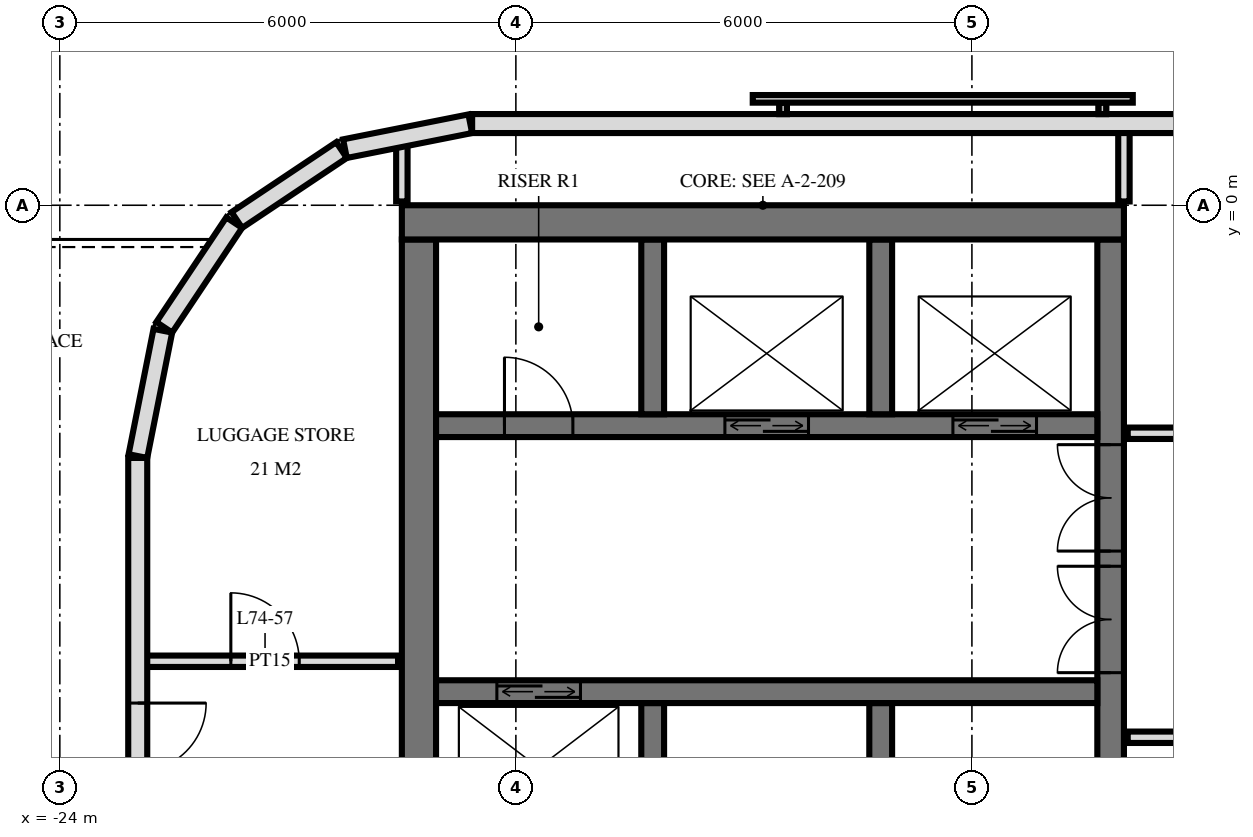
"""IFC4 building model, lengths in metres.
Left out: names, types, materials, properties, quantities, classifications, styles, units other than length and angle.
Written with IfcOpenShell. Run it as: python <this file> out.ifc"""

import sys

from ifc_helpers import new_model, si_unit, direction, frame, frame_2d, origin, place, context, subcontext, project, spatial, rectangle, extrude, element, fill, save


model = new_model("IFC4")
c1 = context("Model", 3, precision=1e-05, world=origin(), true_north=direction((0.0, 1.0)))
c2 = subcontext(c1, "Body", "Model", "MODEL_VIEW")
j1 = project(units=[si_unit("LENGTHUNIT", "METRE"), si_unit("PLANEANGLEUNIT", "RADIAN")], contexts=[c1])
p1 = place(None, origin())
s1 = spatial("IfcSite", under=j1, at=p1, CompositionType="ELEMENT")
p2 = place(p1, origin())
s2 = spatial("IfcBuilding", under=s1, at=p2, CompositionType="ELEMENT")
p3 = place(p2, frame((0.0, 0.0, 280.6)))
s3 = spatial("IfcBuildingStorey", under=s2, at=p3, CompositionType="ELEMENT", Elevation=280.6)
p4 = place(p3, frame((-19.5, -0.225, 0.0), z_axis=(0.0, 0.0, 1.0), x_axis=(1.0, 0.0, 0.0)))
e1 = element("IfcWall", 1, at=p4, inside=s3, PredefinedType="SHEAR", context=c2, shape_type="SweptSolid", body=[
    extrude(rectangle(XDim=9.5, YDim=0.45, at=frame_2d((4.75, 0.0))), origin(), (0.0, 0.0, 1.0), 3.5),
])
p5 = place(p3, frame((-10.175, -14.55, 0.0), z_axis=(0.0, 0.0, 1.0), x_axis=(0.0, 1.0, 0.0)))
e2 = element("IfcWall", 2, at=p5, inside=s3, PredefinedType="SHEAR", context=c2, shape_type="SweptSolid", body=[
    extrude(rectangle(XDim=14.1, YDim=0.35, at=frame_2d((7.05, 0.0))), origin(), (0.0, 0.0, 1.0), 3.5),
])
p6 = place(p5, frame((8.4, 0.0, 0.0)))
e3 = element("IfcOpeningElement", 3, at=p6, cuts=e2, PredefinedType="OPENING", context=c2, shape_type="SweptSolid", body=[
    extrude(rectangle(XDim=1.4, YDim=2.4, at=frame_2d((0.7, 1.2))), frame((0.0, 0.185, 0.0), z_axis=(0.0, -1.0, 0.0), x_axis=(1.0, 0.0, 0.0)), (0.0, 0.0, 1.0), 0.37),
])
p7 = place(p5, frame((10.0, 0.0, 0.0)))
e4 = element("IfcOpeningElement", 4, at=p7, cuts=e2, PredefinedType="OPENING", context=c2, shape_type="SweptSolid", body=[
    extrude(rectangle(XDim=1.4, YDim=2.4, at=frame_2d((0.7, 1.2))), frame((0.0, 0.185, 0.0), z_axis=(0.0, -1.0, 0.0), x_axis=(1.0, 0.0, 0.0)), (0.0, 0.0, 1.0), 0.37),
])
p8 = place(p5, frame((4.0, 0.0, 0.0)))
e5 = element("IfcOpeningElement", 5, at=p8, cuts=e2, PredefinedType="OPENING", context=c2, shape_type="SweptSolid", body=[
    extrude(rectangle(XDim=1.2, YDim=2.1, at=frame_2d((0.6, 1.05))), frame((0.0, 0.185, 0.0), z_axis=(0.0, -1.0, 0.0), x_axis=(1.0, 0.0, 0.0)), (0.0, 0.0, 1.0), 0.37),
])
p9 = place(p3, frame((-19.275, -14.55, 0.0), z_axis=(0.0, 0.0, 1.0), x_axis=(0.0, 1.0, 0.0)))
e6 = element("IfcWall", 6, at=p9, inside=s3, PredefinedType="SHEAR", context=c2, shape_type="SweptSolid", body=[
    extrude(rectangle(XDim=14.1, YDim=0.45, at=frame_2d((7.05, 0.0))), origin(), (0.0, 0.0, 1.0), 3.5),
])
p10 = place(p3, frame((-19.05, -2.9, 0.0), z_axis=(0.0, 0.0, 1.0), x_axis=(1.0, 0.0, 0.0)))
e7 = element("IfcWall", 7, at=p10, inside=s3, PredefinedType="SHEAR", context=c2, shape_type="SweptSolid", body=[
    extrude(rectangle(XDim=8.7, YDim=0.3, at=frame_2d((4.35, 0.0))), origin(), (0.0, 0.0, 1.0), 3.5),
])
p11 = place(p10, frame((6.8, 0.0, 0.0)))
e8 = element("IfcOpeningElement", 8, at=p11, cuts=e7, PredefinedType="OPENING", context=c2, shape_type="SweptSolid", body=[
    extrude(rectangle(XDim=1.1, YDim=2.1, at=frame_2d((0.55, 1.05))), frame((0.0, 0.16, 0.0), z_axis=(0.0, -1.0, 0.0), x_axis=(1.0, 0.0, 0.0)), (0.0, 0.0, 1.0), 0.32),
])
p12 = place(p10, frame((3.8, 0.0, 0.0)))
e9 = element("IfcOpeningElement", 9, at=p12, cuts=e7, PredefinedType="OPENING", context=c2, shape_type="SweptSolid", body=[
    extrude(rectangle(XDim=1.1, YDim=2.1, at=frame_2d((0.55, 1.05))), frame((0.0, 0.16, 0.0), z_axis=(0.0, -1.0, 0.0), x_axis=(1.0, 0.0, 0.0)), (0.0, 0.0, 1.0), 0.32),
])
p13 = place(p10, frame((0.9, 0.0, 0.0)))
e10 = element("IfcOpeningElement", 10, at=p13, cuts=e7, PredefinedType="OPENING", context=c2, shape_type="SweptSolid", body=[
    extrude(rectangle(XDim=0.9, YDim=2.1, at=frame_2d((0.45, 1.05))), frame((0.0, 0.16, 0.0), z_axis=(0.0, -1.0, 0.0), x_axis=(1.0, 0.0, 0.0)), (0.0, 0.0, 1.0), 0.32),
])
p14 = place(p3, frame((-19.05, -6.4, 0.0), z_axis=(0.0, 0.0, 1.0), x_axis=(1.0, 0.0, 0.0)))
e11 = element("IfcWall", 11, at=p14, inside=s3, PredefinedType="SHEAR", context=c2, shape_type="SweptSolid", body=[
    extrude(rectangle(XDim=8.7, YDim=0.3, at=frame_2d((4.35, 0.0))), origin(), (0.0, 0.0, 1.0), 3.5),
])
p15 = place(p14, frame((0.8, 0.0, 0.0)))
e12 = element("IfcOpeningElement", 12, at=p15, cuts=e11, PredefinedType="OPENING", context=c2, shape_type="SweptSolid", body=[
    extrude(rectangle(XDim=1.1, YDim=2.1, at=frame_2d((0.55, 1.05))), frame((0.0, 0.16, 0.0), z_axis=(0.0, -1.0, 0.0), x_axis=(1.0, 0.0, 0.0)), (0.0, 0.0, 1.0), 0.32),
])
for number, where, z_axis, x_axis in (
    (13, (-13.2, -2.75, 0.0), (0.0, 0.0, 1.0), (0.0, 1.0, 0.0)),
    (14, (-13.2, -8.85, 0.0), (0.0, 0.0, 1.0), (0.0, 1.0, 0.0)),
    (15, (-16.2, -2.75, 0.0), (0.0, 0.0, 1.0), (0.0, 1.0, 0.0)),
    (16, (-16.2, -8.85, 0.0), (0.0, 0.0, 1.0), (0.0, 1.0, 0.0)),
):
    element("IfcWall", number, at=place(p3, frame(where, z_axis=z_axis, x_axis=x_axis)), inside=s3, PredefinedType="SHEAR", context=c2, shape_type="SweptSolid", body=[
        extrude(rectangle(XDim=2.3, YDim=0.3, at=frame_2d((1.15, 0.0))), origin(), (0.0, 0.0, 1.0), 3.5),
    ])
p16 = place(p3, frame((18.575, 1.075, 0.0), z_axis=(0.0, 0.0, 1.0), x_axis=(-1.0, 0.0, 0.0)))
e17 = element("IfcWall", 17, at=p16, inside=s3, PredefinedType="SOLIDWALL", context=c2, shape_type="SweptSolid", body=[
    extrude(rectangle(XDim=37.151, YDim=0.25, at=frame_2d((18.575, 0.0))), origin(), (0.0, 0.0, 1.0), 3.22),
])
p17 = place(p16, frame((15.275, 0.0, 0.9)))
e18 = element("IfcOpeningElement", 18, at=p17, cuts=e17, PredefinedType="OPENING", context=c2, shape_type="SweptSolid", body=[
    extrude(rectangle(XDim=2.4, YDim=1.5, at=frame_2d((1.2, 0.75))), frame((0.0, 0.135, 0.0), z_axis=(0.0, -1.0, 0.0), x_axis=(1.0, 0.0, 0.0)), (0.0, 0.0, 1.0), 0.27),
])
p18 = place(p16, frame((21.275, 0.0, 0.9)))
e19 = element("IfcOpeningElement", 19, at=p18, cuts=e17, PredefinedType="OPENING", context=c2, shape_type="SweptSolid", body=[
    extrude(rectangle(XDim=2.4, YDim=1.5, at=frame_2d((1.2, 0.75))), frame((0.0, 0.135, 0.0), z_axis=(0.0, -1.0, 0.0), x_axis=(1.0, 0.0, 0.0)), (0.0, 0.0, 1.0), 0.27),
])
p19 = place(p16, frame((24.275, 0.0, 0.9)))
e20 = element("IfcOpeningElement", 20, at=p19, cuts=e17, PredefinedType="OPENING", context=c2, shape_type="SweptSolid", body=[
    extrude(rectangle(XDim=2.4, YDim=1.5, at=frame_2d((1.2, 0.75))), frame((0.0, 0.135, 0.0), z_axis=(0.0, -1.0, 0.0), x_axis=(1.0, 0.0, 0.0)), (0.0, 0.0, 1.0), 0.27),
])
p20 = place(p3, frame((-18.6, 1.073, 0.0), z_axis=(0.0, 0.0, 1.0), x_axis=(-0.980797896849, -0.195026884138, 0.0)))
e21 = element("IfcWall", 21, at=p20, inside=s3, PredefinedType="SOLIDWALL", context=c2, shape_type="SweptSolid", body=[
    extrude(rectangle(XDim=1.681, YDim=0.25, at=frame_2d((0.841, 0.0))), origin(), (0.0, 0.0, 1.0), 3.22),
])
for number, where, z_axis, x_axis in (
    (22, (-20.294, 0.726, 0.0), (0.0, 0.0, 1.0), (-0.831, -0.556, 0.0)),
    (23, (-21.706, -0.229, 0.0), (0.0, 0.0, 1.0), (-0.556, -0.831, 0.0)),
):
    element("IfcWall", number, at=place(p3, frame(where, z_axis=z_axis, x_axis=x_axis)), inside=s3, PredefinedType="SOLIDWALL", context=c2, shape_type="SweptSolid", body=[
        extrude(rectangle(XDim=1.656, YDim=0.25, at=frame_2d((0.828, 0.0))), origin(), (0.0, 0.0, 1.0), 3.22),
    ])
p21 = place(p3, frame((-22.645, -1.651, 0.0), z_axis=(0.0, 0.0, 1.0), x_axis=(-0.19513878023, -0.980775640221, 0.0)))
e24 = element("IfcWall", 24, at=p21, inside=s3, PredefinedType="SOLIDWALL", context=c2, shape_type="SweptSolid", body=[
    extrude(rectangle(XDim=1.681, YDim=0.25, at=frame_2d((0.841, 0.0))), origin(), (0.0, 0.0, 1.0), 3.22),
])
p22 = place(p3, frame((-22.975, -3.325, 0.0), z_axis=(0.0, 0.0, 1.0), x_axis=(0.0, -1.0, 0.0)))
e25 = element("IfcWall", 25, at=p22, inside=s3, PredefinedType="SOLIDWALL", context=c2, shape_type="SweptSolid", body=[
    extrude(rectangle(XDim=25.951, YDim=0.25, at=frame_2d((12.975, 0.0))), origin(), (0.0, 0.0, 1.0), 3.22),
])
p23 = place(p22, frame((3.225, 0.0, 0.0)))
e26 = element("IfcOpeningElement", 26, at=p23, cuts=e25, PredefinedType="OPENING", context=c2, shape_type="SweptSolid", body=[
    extrude(rectangle(XDim=1.8, YDim=2.4, at=frame_2d((0.9, 1.2))), frame((0.0, 0.135, 0.0), z_axis=(0.0, -1.0, 0.0), x_axis=(1.0, 0.0, 0.0)), (0.0, 0.0, 1.0), 0.27),
])
p24 = place(p22, frame((7.975, 0.0, 0.0)))
e27 = element("IfcOpeningElement", 27, at=p24, cuts=e25, PredefinedType="OPENING", context=c2, shape_type="SweptSolid", body=[
    extrude(rectangle(XDim=1.8, YDim=2.4, at=frame_2d((0.9, 1.2))), frame((0.0, 0.135, 0.0), z_axis=(0.0, -1.0, 0.0), x_axis=(1.0, 0.0, 0.0)), (0.0, 0.0, 1.0), 0.27),
])
p25 = place(p22, frame((12.275, 0.0, 0.9)))
e28 = element("IfcOpeningElement", 28, at=p25, cuts=e25, PredefinedType="OPENING", context=c2, shape_type="SweptSolid", body=[
    extrude(rectangle(XDim=1.2, YDim=1.5, at=frame_2d((0.6, 0.75))), frame((0.0, 0.135, 0.0), z_axis=(0.0, -1.0, 0.0), x_axis=(1.0, 0.0, 0.0)), (0.0, 0.0, 1.0), 0.27),
])
p26 = place(p22, frame((18.175, 0.0, 0.0)))
e29 = element("IfcOpeningElement", 29, at=p26, cuts=e25, PredefinedType="OPENING", context=c2, shape_type="SweptSolid", body=[
    extrude(rectangle(XDim=1.8, YDim=2.4, at=frame_2d((0.9, 1.2))), frame((0.0, 0.135, 0.0), z_axis=(0.0, -1.0, 0.0), x_axis=(1.0, 0.0, 0.0)), (0.0, 0.0, 1.0), 0.27),
])
p27 = place(p22, frame((21.075, 0.0, 0.0)))
e30 = element("IfcOpeningElement", 30, at=p27, cuts=e25, PredefinedType="OPENING", context=c2, shape_type="SweptSolid", body=[
    extrude(rectangle(XDim=1.8, YDim=2.4, at=frame_2d((0.9, 1.2))), frame((0.0, 0.135, 0.0), z_axis=(0.0, -1.0, 0.0), x_axis=(1.0, 0.0, 0.0)), (0.0, 0.0, 1.0), 0.27),
])
p28 = place(p22, frame((23.825, 0.0, 0.9)))
e31 = element("IfcOpeningElement", 31, at=p28, cuts=e25, PredefinedType="OPENING", context=c2, shape_type="SweptSolid", body=[
    extrude(rectangle(XDim=1.8, YDim=1.5, at=frame_2d((0.9, 0.75))), frame((0.0, 0.135, 0.0), z_axis=(0.0, -1.0, 0.0), x_axis=(1.0, 0.0, 0.0)), (0.0, 0.0, 1.0), 0.27),
])
p29 = place(p3, frame((-10.0, 0.05, 0.0), z_axis=(0.0, 0.0, 1.0), x_axis=(0.0, 1.0, 0.0)))
e32 = element("IfcWall", 32, at=p29, inside=s3, PredefinedType="PARTITIONING", context=c2, shape_type="SweptSolid", body=[
    extrude(rectangle(XDim=0.97, YDim=0.15, at=frame_2d((0.485, 0.0))), origin(), (0.0, 0.0, 1.0), 3.22),
])
p30 = place(p3, frame((-19.5, 0.05, 0.0), z_axis=(0.0, 0.0, 1.0), x_axis=(0.0, 1.0, 0.0)))
e33 = element("IfcWall", 33, at=p30, inside=s3, PredefinedType="PARTITIONING", context=c2, shape_type="SweptSolid", body=[
    extrude(rectangle(XDim=0.787, YDim=0.15, at=frame_2d((0.394, 0.0))), origin(), (0.0, 0.0, 1.0), 3.22),
])
p31 = place(p3, frame((-9.95, -7.0, 0.0), z_axis=(0.0, 0.0, 1.0), x_axis=(1.0, 0.0, 0.0)))
e34 = element("IfcWall", 34, at=p31, inside=s3, PredefinedType="PARTITIONING", context=c2, shape_type="SweptSolid", body=[
    extrude(rectangle(XDim=19.9, YDim=0.15, at=frame_2d((9.95, 0.0))), origin(), (0.0, 0.0, 1.0), 3.22),
])
p32 = place(p31, frame((9.45, 0.0, 0.0)))
e35 = element("IfcOpeningElement", 35, at=p32, cuts=e34, PredefinedType="OPENING", context=c2, shape_type="SweptSolid", body=[
    extrude(rectangle(XDim=1.0, YDim=2.1, at=frame_2d((0.5, 1.05))), frame((0.0, 0.085, 0.0), z_axis=(0.0, -1.0, 0.0), x_axis=(1.0, 0.0, 0.0)), (0.0, 0.0, 1.0), 0.17),
])
p33 = place(p31, frame((3.45, 0.0, 0.0)))
e36 = element("IfcOpeningElement", 36, at=p33, cuts=e34, PredefinedType="OPENING", context=c2, shape_type="SweptSolid", body=[
    extrude(rectangle(XDim=1.0, YDim=2.1, at=frame_2d((0.5, 1.05))), frame((0.0, 0.085, 0.0), z_axis=(0.0, -1.0, 0.0), x_axis=(1.0, 0.0, 0.0)), (0.0, 0.0, 1.0), 0.17),
])
p34 = place(p3, frame((-22.92, -6.0, 0.0), z_axis=(0.0, 0.0, 1.0), x_axis=(1.0, 0.0, 0.0)))
e37 = element("IfcWall", 37, at=p34, inside=s3, PredefinedType="PARTITIONING", context=c2, shape_type="SweptSolid", body=[
    extrude(rectangle(XDim=3.37, YDim=0.15, at=frame_2d((1.685, 0.0))), origin(), (0.0, 0.0, 1.0), 3.22),
])
p35 = place(p34, frame((1.17, 0.0, 0.0)))
e38 = element("IfcOpeningElement", 38, at=p35, cuts=e37, PredefinedType="OPENING", context=c2, shape_type="SweptSolid", body=[
    extrude(rectangle(XDim=0.9, YDim=2.1, at=frame_2d((0.45, 1.05))), frame((0.0, 0.085, 0.0), z_axis=(0.0, -1.0, 0.0), x_axis=(1.0, 0.0, 0.0)), (0.0, 0.0, 1.0), 0.17),
])
p36 = place(p3, frame((-9.95, -3.0, 0.0), z_axis=(0.0, 0.0, 1.0), x_axis=(1.0, 0.0, 0.0)))
e39 = element("IfcWall", 39, at=p36, inside=s3, PredefinedType="PARTITIONING", context=c2, shape_type="SweptSolid", body=[
    extrude(rectangle(XDim=19.9, YDim=0.15, at=frame_2d((9.95, 0.0))), origin(), (0.0, 0.0, 1.0), 3.22),
])
p37 = place(p36, frame((4.2, 0.0, 0.0)))
e40 = element("IfcOpeningElement", 40, at=p37, cuts=e39, PredefinedType="OPENING", context=c2, shape_type="SweptSolid", body=[
    extrude(rectangle(XDim=1.0, YDim=2.1, at=frame_2d((0.5, 1.05))), frame((0.0, 0.085, 0.0), z_axis=(0.0, -1.0, 0.0), x_axis=(1.0, 0.0, 0.0)), (0.0, 0.0, 1.0), 0.17),
])
p38 = place(p36, frame((11.45, 0.0, 0.0)))
e41 = element("IfcOpeningElement", 41, at=p38, cuts=e39, PredefinedType="OPENING", context=c2, shape_type="SweptSolid", body=[
    extrude(rectangle(XDim=1.0, YDim=2.1, at=frame_2d((0.5, 1.05))), frame((0.0, 0.085, 0.0), z_axis=(0.0, -1.0, 0.0), x_axis=(1.0, 0.0, 0.0)), (0.0, 0.0, 1.0), 0.17),
])
p39 = place(p36, frame((15.45, 0.0, 0.0)))
e42 = element("IfcOpeningElement", 42, at=p39, cuts=e39, PredefinedType="OPENING", context=c2, shape_type="SweptSolid", body=[
    extrude(rectangle(XDim=1.0, YDim=2.1, at=frame_2d((0.5, 1.05))), frame((0.0, 0.085, 0.0), z_axis=(0.0, -1.0, 0.0), x_axis=(1.0, 0.0, 0.0)), (0.0, 0.0, 1.0), 0.17),
])
p40 = place(p36, frame((18.2, 0.0, 0.0)))
e43 = element("IfcOpeningElement", 43, at=p40, cuts=e39, PredefinedType="OPENING", context=c2, shape_type="SweptSolid", body=[
    extrude(rectangle(XDim=1.0, YDim=2.1, at=frame_2d((0.5, 1.05))), frame((0.0, 0.085, 0.0), z_axis=(0.0, -1.0, 0.0), x_axis=(1.0, 0.0, 0.0)), (0.0, 0.0, 1.0), 0.17),
])
p41 = place(p23, origin())
e44 = element("IfcDoor", 44, at=p41, inside=s3, OperationType="DOUBLE_DOOR_SINGLE_SWING", PredefinedType="DOOR", context=c2, shape_type="SweptSolid", body=[
    extrude(rectangle(XDim=1.8, YDim=2.4, at=frame_2d((0.9, 1.2))), frame((0.0, 0.025, 0.0), z_axis=(0.0, -1.0, 0.0), x_axis=(1.0, 0.0, 0.0)), (0.0, 0.0, 1.0), 0.05),
])
fill(e26, e44)
p42 = place(p11, origin())
e45 = element("IfcDoor", 45, at=p42, inside=s3, OperationType="DOUBLE_DOOR_SLIDING", PredefinedType="USERDEFINED", context=c2, shape_type="SweptSolid", body=[
    extrude(rectangle(XDim=1.1, YDim=2.1, at=frame_2d((0.55, 1.05))), frame((0.0, 0.025, 0.0), z_axis=(0.0, -1.0, 0.0), x_axis=(1.0, 0.0, 0.0)), (0.0, 0.0, 1.0), 0.05),
])
fill(e8, e45)
p43 = place(p12, origin())
e46 = element("IfcDoor", 46, at=p43, inside=s3, OperationType="DOUBLE_DOOR_SLIDING", PredefinedType="USERDEFINED", context=c2, shape_type="SweptSolid", body=[
    extrude(rectangle(XDim=1.1, YDim=2.1, at=frame_2d((0.55, 1.05))), frame((0.0, 0.025, 0.0), z_axis=(0.0, -1.0, 0.0), x_axis=(1.0, 0.0, 0.0)), (0.0, 0.0, 1.0), 0.05),
])
fill(e9, e46)
p44 = place(p15, origin())
e47 = element("IfcDoor", 47, at=p44, inside=s3, OperationType="DOUBLE_DOOR_SLIDING", PredefinedType="USERDEFINED", context=c2, shape_type="SweptSolid", body=[
    extrude(rectangle(XDim=1.1, YDim=2.1, at=frame_2d((0.55, 1.05))), frame((0.0, 0.025, 0.0), z_axis=(0.0, -1.0, 0.0), x_axis=(1.0, 0.0, 0.0)), (0.0, 0.0, 1.0), 0.05),
])
fill(e12, e47)
p45 = place(p6, origin())
e48 = element("IfcDoor", 48, at=p45, inside=s3, OperationType="DOUBLE_DOOR_SINGLE_SWING", PredefinedType="DOOR", context=c2, shape_type="SweptSolid", body=[
    extrude(rectangle(XDim=1.4, YDim=2.4, at=frame_2d((0.7, 1.2))), frame((0.0, 0.025, 0.0), z_axis=(0.0, -1.0, 0.0), x_axis=(1.0, 0.0, 0.0)), (0.0, 0.0, 1.0), 0.05),
])
fill(e3, e48)
p46 = place(p7, origin())
e49 = element("IfcDoor", 49, at=p46, inside=s3, OperationType="DOUBLE_DOOR_SINGLE_SWING", PredefinedType="DOOR", context=c2, shape_type="SweptSolid", body=[
    extrude(rectangle(XDim=1.4, YDim=2.4, at=frame_2d((0.7, 1.2))), frame((0.0, 0.025, 0.0), z_axis=(0.0, -1.0, 0.0), x_axis=(1.0, 0.0, 0.0)), (0.0, 0.0, 1.0), 0.05),
])
fill(e4, e49)
p47 = place(p13, origin())
e50 = element("IfcDoor", 50, at=p47, inside=s3, OperationType="SINGLE_SWING_RIGHT", PredefinedType="DOOR", context=c2, shape_type="SweptSolid", body=[
    extrude(rectangle(XDim=0.9, YDim=2.1, at=frame_2d((0.45, 1.05))), frame((0.0, 0.025, 0.0), z_axis=(0.0, -1.0, 0.0), x_axis=(1.0, 0.0, 0.0)), (0.0, 0.0, 1.0), 0.05),
])
fill(e10, e50)
p48 = place(p35, origin())
e51 = element("IfcDoor", 51, at=p48, inside=s3, OperationType="SINGLE_SWING_RIGHT", PredefinedType="DOOR", context=c2, shape_type="SweptSolid", body=[
    extrude(rectangle(XDim=0.9, YDim=2.1, at=frame_2d((0.45, 1.05))), frame((0.0, 0.025, 0.0), z_axis=(0.0, -1.0, 0.0), x_axis=(1.0, 0.0, 0.0)), (0.0, 0.0, 1.0), 0.05),
])
fill(e38, e51)
save(model, sys.argv[1])
